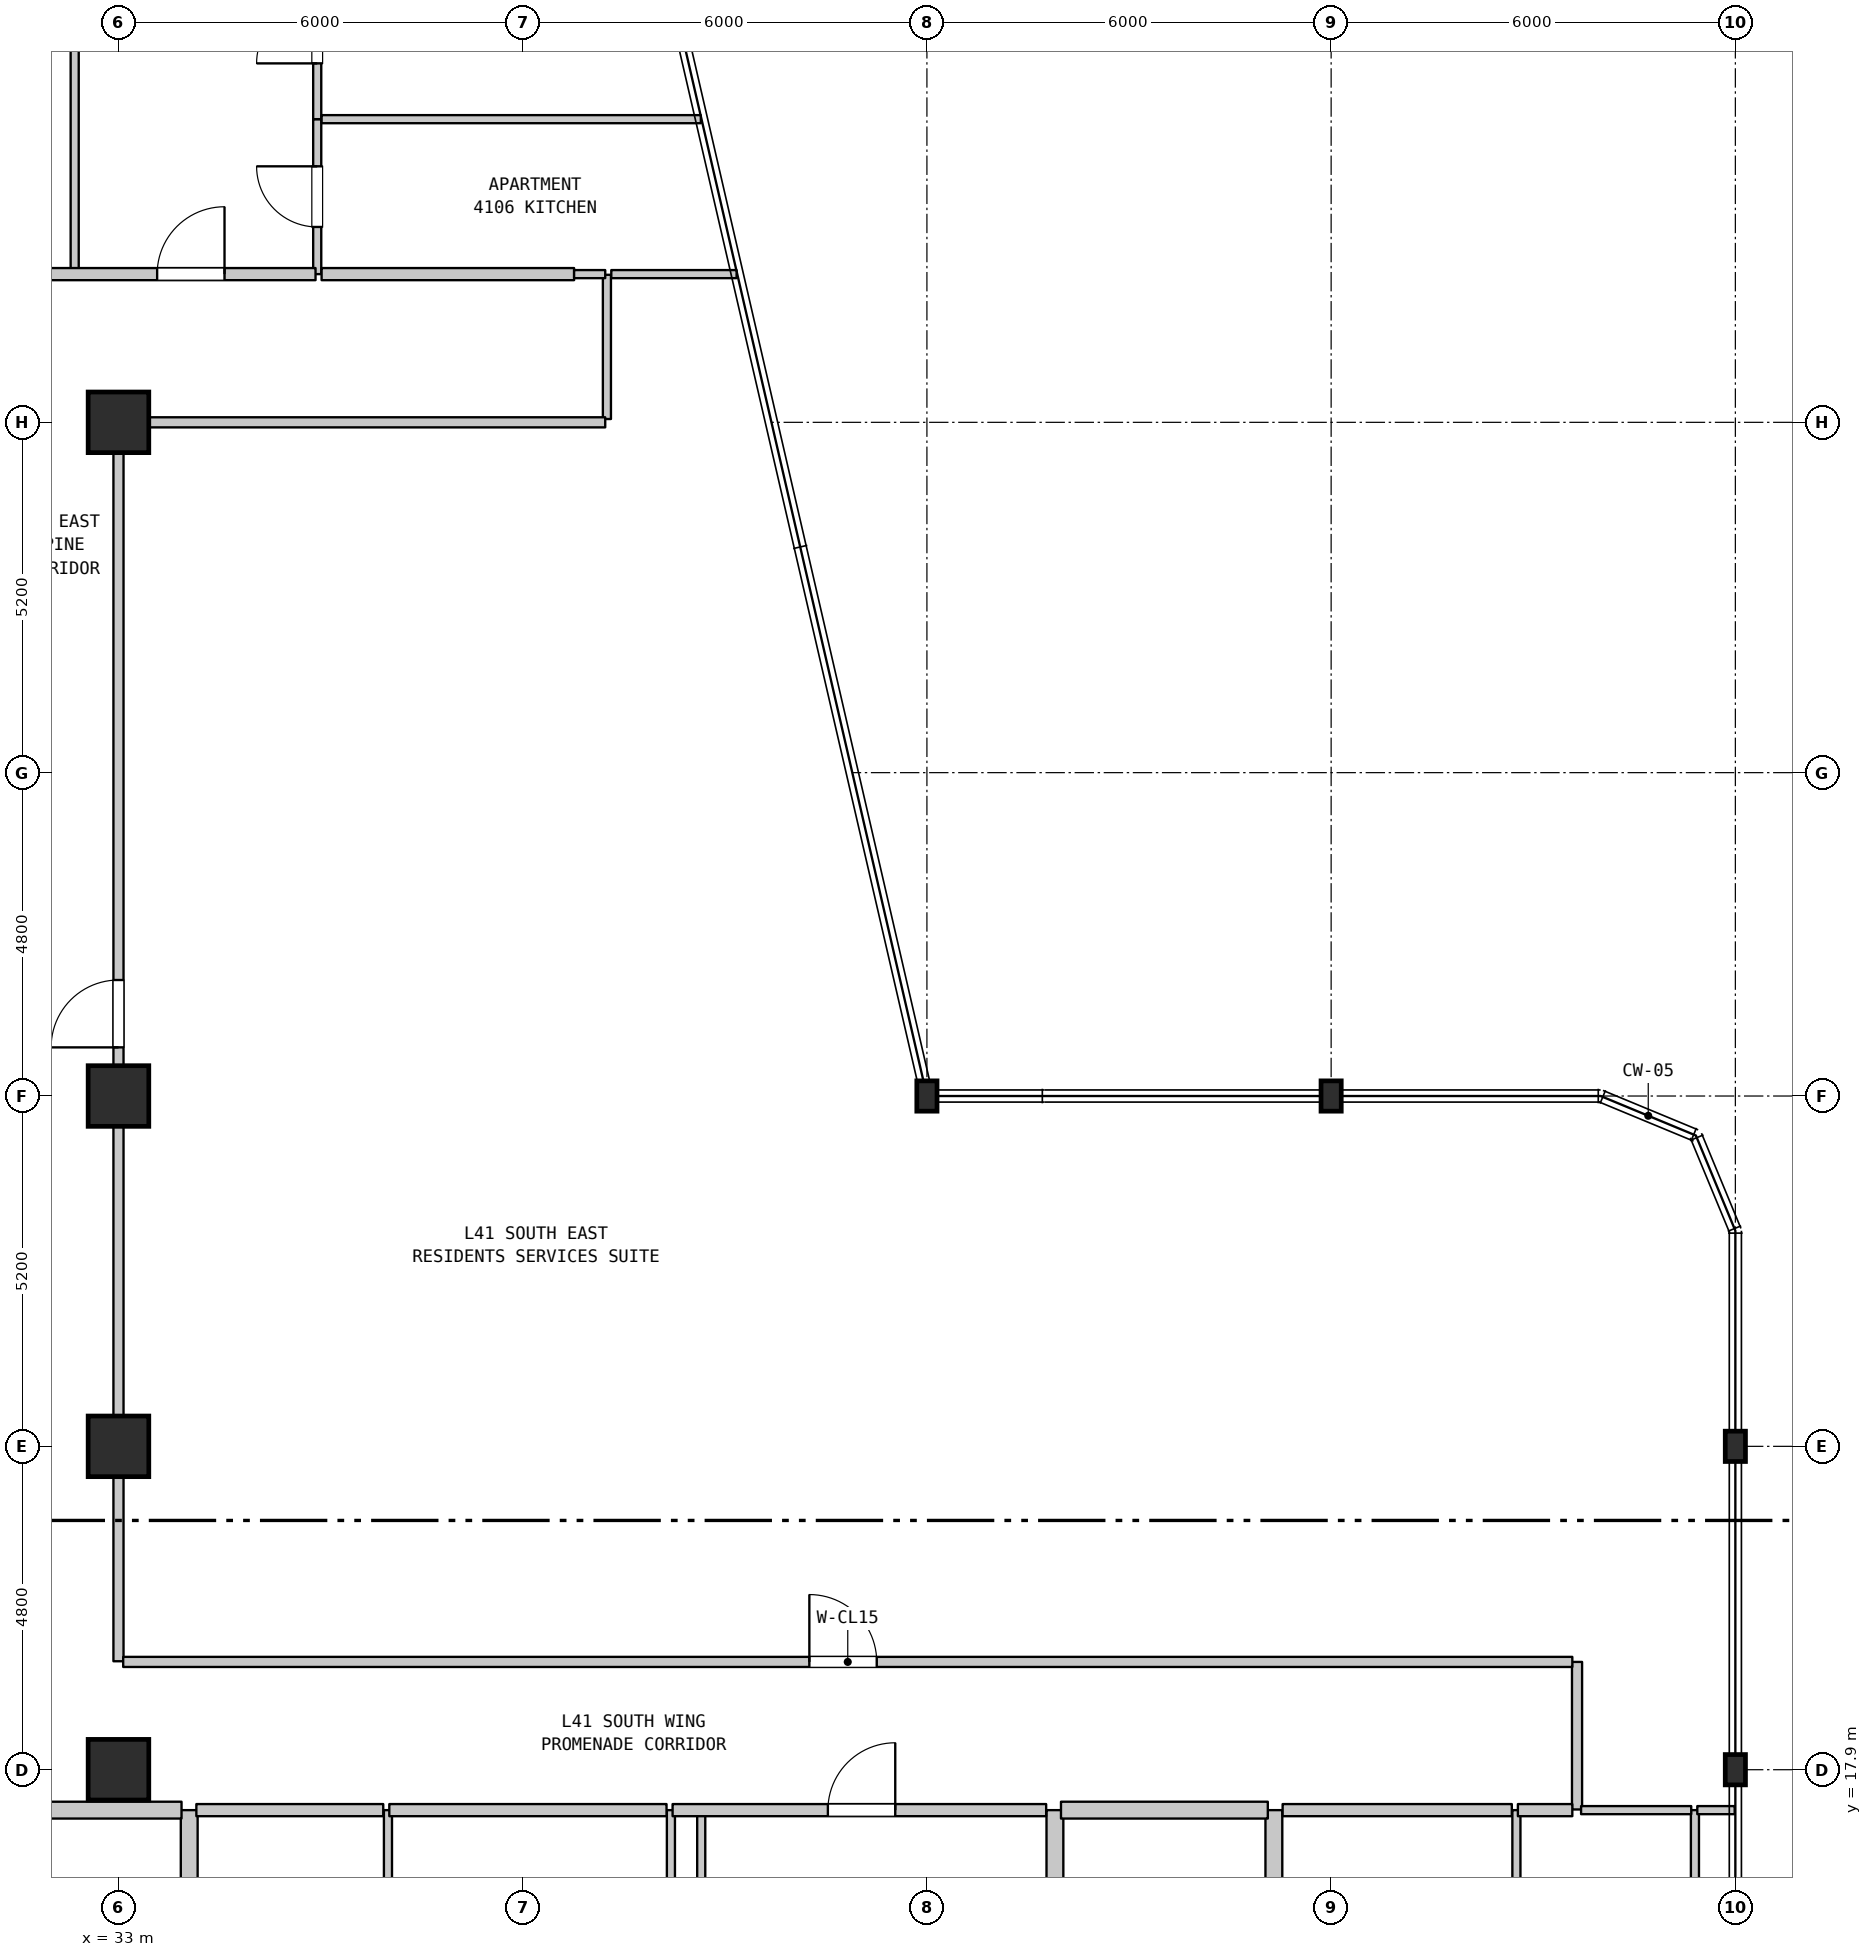
"""IFC4 building model, lengths in metres.
Left out: names, types, materials, properties, quantities, classifications, styles, units other than length and angle.
Written with IfcOpenShell. Run it as: python <this file> out.ifc"""

import sys

from ifc_helpers import new_model, si_unit, direction, frame, frame_2d, origin, origin_2d, place, context, subcontext, project, spatial, rectangle, i_section, extrude, element, fill, save


model = new_model("IFC4")
c1 = context("Model", 3, precision=1e-05, world=origin(), true_north=direction((0.0, 1.0)))
c2 = subcontext(c1, "Body", "Model", "MODEL_VIEW")
j1 = project(units=[si_unit("LENGTHUNIT", "METRE"), si_unit("PLANEANGLEUNIT", "RADIAN")], contexts=[c1])
p1 = place(None, origin())
s1 = spatial("IfcSite", under=j1, at=p1, CompositionType="ELEMENT")
p2 = place(p1, origin())
s2 = spatial("IfcBuilding", under=s1, at=p2, CompositionType="ELEMENT")
p3 = place(p2, frame((0.0, 0.0, 169.1)))
s3 = spatial("IfcBuildingStorey", under=s2, at=p3, CompositionType="ELEMENT", Elevation=169.1)
for number, where, z_axis, x_axis in (
    (1, (33.0, 17.9, 0.0), (0.0, 0.0, 1.0), (1.0, 0.0, 0.0)),
    (2, (33.0, 22.7, 0.0), (0.0, 0.0, 1.0), (1.0, 0.0, 0.0)),
    (3, (33.0, 27.9, 0.0), (0.0, 0.0, 1.0), (1.0, 0.0, 0.0)),
    (4, (33.0, 37.9, 0.0), (0.0, 0.0, 1.0), (1.0, 0.0, 0.0)),
):
    element("IfcColumn", number, at=place(p3, frame(where, z_axis=z_axis, x_axis=x_axis)), inside=s3, PredefinedType="COLUMN", context=c2, shape_type="SweptSolid", body=[
        extrude(rectangle(XDim=0.9, YDim=0.9, at=origin_2d()), origin(), (0.0, 0.0, 1.0), 3.7),
    ])
for number, where, z_axis, x_axis in (
    (5, (45.0, 27.9, 0.0), (0.0, 0.0, 1.0), (1.0, 0.0, 0.0)),
    (6, (51.0, 27.9, 0.0), (0.0, 0.0, 1.0), (1.0, 0.0, 0.0)),
    (7, (57.0, 17.9, 0.0), (0.0, 0.0, 1.0), (1.0, 0.0, 0.0)),
    (8, (57.0, 22.7, 0.0), (0.0, 0.0, 1.0), (1.0, 0.0, 0.0)),
):
    element("IfcColumn", number, at=place(p3, frame(where, z_axis=z_axis, x_axis=x_axis)), inside=s3, PredefinedType="COLUMN", context=c2, shape_type="SweptSolid", body=[
        extrude(i_section(OverallWidth=0.3, OverallDepth=0.45, WebThickness=0.014, FlangeThickness=0.026, FilletRadius=0.027, at=origin_2d()), origin(), (0.0, 0.0, 1.0), 3.7),
    ])
p4 = place(p3, frame((32.35, 40.1, 0.0), z_axis=(0.0, 0.0, 1.0), x_axis=(0.0, 1.0, 0.0)))
e9 = element("IfcWall", 9, at=p4, inside=s3, PredefinedType="PARTITIONING", context=c2, shape_type="SweptSolid", body=[
    extrude(rectangle(XDim=13.79, YDim=0.12, at=frame_2d((6.895, 0.0))), origin(), (0.0, 0.0, 1.0), 3.39),
])
p5 = place(p3, frame((33.0, 19.51, 0.0), z_axis=(0.0, 0.0, 1.0), x_axis=(0.0, 1.0, 0.0)))
e10 = element("IfcWall", 10, at=p5, inside=s3, PredefinedType="STANDARD", context=c2, shape_type="SweptSolid", body=[
    extrude(rectangle(XDim=8.39, YDim=0.15, at=frame_2d((4.195, 0.0))), origin(), (0.0, 0.0, 1.0), 2.99),
])
p6 = place(p3, frame((34.05, 11.15, 0.0), z_axis=(0.0, 0.0, 1.0), x_axis=(0.0, 1.0, 0.0)))
e11 = element("IfcWall", 11, at=p6, inside=s3, PredefinedType="STANDARD", context=c2, shape_type="SweptSolid", body=[
    extrude(rectangle(XDim=6.15, YDim=0.25, at=frame_2d((3.075, 0.0))), origin(), (0.0, 0.0, 1.0), 3.39),
])
p7 = place(p3, frame((35.95, 40.1, 0.0), z_axis=(0.0, 0.0, 1.0), x_axis=(0.0, 1.0, 0.0)))
e12 = element("IfcWall", 12, at=p7, inside=s3, PredefinedType="PARTITIONING", context=c2, shape_type="SweptSolid", body=[
    extrude(rectangle(XDim=2.3, YDim=0.12, at=frame_2d((1.15, 0.0))), origin(), (0.0, 0.0, 1.0), 3.39),
])
p8 = place(p7, frame((0.7, 0.0, 0.0)))
e13 = element("IfcOpeningElement", 13, at=p8, cuts=e12, PredefinedType="OPENING", context=c2, shape_type="SweptSolid", body=[
    extrude(rectangle(XDim=0.9, YDim=2.15, at=frame_2d((0.45, 1.075))), frame((0.0, 0.07, 0.0), z_axis=(0.0, -1.0, 0.0), x_axis=(1.0, 0.0, 0.0)), (0.0, 0.0, 1.0), 0.14),
])
p9 = place(p3, frame((35.95, 42.4, 0.0), z_axis=(0.0, 0.0, 1.0), x_axis=(0.0, 1.0, 0.0)))
e14 = element("IfcWall", 14, at=p9, inside=s3, PredefinedType="PARTITIONING", context=c2, shape_type="SweptSolid", body=[
    extrude(rectangle(XDim=2.7, YDim=0.12, at=frame_2d((1.35, 0.0))), origin(), (0.0, 0.0, 1.0), 3.39),
])
p10 = place(p9, frame((0.828, 0.0, 0.0)))
e15 = element("IfcOpeningElement", 15, at=p10, cuts=e14, PredefinedType="OPENING", context=c2, shape_type="SweptSolid", body=[
    extrude(rectangle(XDim=0.9, YDim=2.1, at=frame_2d((0.45, 1.05))), frame((0.0, 0.07, 0.0), z_axis=(0.0, -1.0, 0.0), x_axis=(1.0, 0.0, 0.0)), (0.0, 0.0, 1.0), 0.14),
])
p11 = place(p3, frame((37.0, 11.15, 0.0), z_axis=(0.0, 0.0, 1.0), x_axis=(0.0, 1.0, 0.0)))
e16 = element("IfcWall", 16, at=p11, inside=s3, PredefinedType="PARTITIONING", context=c2, shape_type="SweptSolid", body=[
    extrude(rectangle(XDim=6.15, YDim=0.12, at=frame_2d((3.075, 0.0))), origin(), (0.0, 0.0, 1.0), 3.39),
])
p12 = place(p3, frame((40.25, 37.949, 0.0), z_axis=(0.0, 0.0, 1.0), x_axis=(0.0, 1.0, 0.0)))
e17 = element("IfcWall", 17, at=p12, inside=s3, PredefinedType="PARTITIONING", context=c2, shape_type="SweptSolid", body=[
    extrude(rectangle(XDim=2.141, YDim=0.12, at=frame_2d((1.071, 0.0))), origin(), (0.0, 0.0, 1.0), 3.39),
])
p13 = place(p3, frame((41.2, 11.15, 0.0), z_axis=(0.0, 0.0, 1.0), x_axis=(0.0, 1.0, 0.0)))
e18 = element("IfcWall", 18, at=p13, inside=s3, PredefinedType="PARTITIONING", context=c2, shape_type="SweptSolid", body=[
    extrude(rectangle(XDim=6.15, YDim=0.12, at=frame_2d((3.075, 0.0))), origin(), (0.0, 0.0, 1.0), 3.39),
])
p14 = place(p3, frame((41.65, 14.85, 0.0), z_axis=(0.0, 0.0, 1.0), x_axis=(0.0, 1.0, 0.0)))
e19 = element("IfcWall", 19, at=p14, inside=s3, PredefinedType="PARTITIONING", context=c2, shape_type="SweptSolid", body=[
    extrude(rectangle(XDim=2.45, YDim=0.12, at=frame_2d((1.225, 0.0))), origin(), (0.0, 0.0, 1.0), 3.39),
])
for number, where, z_axis, x_axis in (
    (20, (46.9, 11.15, 0.0), (0.0, 0.0, 1.0), (0.0, 1.0, 0.0)),
    (21, (50.15, 11.15, 0.0), (0.0, 0.0, 1.0), (0.0, 1.0, 0.0)),
):
    element("IfcWall", number, at=place(p3, frame(where, z_axis=z_axis, x_axis=x_axis)), inside=s3, PredefinedType="STANDARD", context=c2, shape_type="SweptSolid", body=[
        extrude(rectangle(XDim=6.15, YDim=0.25, at=frame_2d((3.075, 0.0))), origin(), (0.0, 0.0, 1.0), 3.39),
    ])
p15 = place(p3, frame((53.75, 11.15, 0.0), z_axis=(0.0, 0.0, 1.0), x_axis=(0.0, 1.0, 0.0)))
e22 = element("IfcWall", 22, at=p15, inside=s3, PredefinedType="PARTITIONING", context=c2, shape_type="SweptSolid", body=[
    extrude(rectangle(XDim=6.15, YDim=0.12, at=frame_2d((3.075, 0.0))), origin(), (0.0, 0.0, 1.0), 3.39),
])
p16 = place(p3, frame((54.65, 17.31, 0.0), z_axis=(0.0, 0.0, 1.0), x_axis=(0.0, 1.0, 0.0)))
e23 = element("IfcWall", 23, at=p16, inside=s3, PredefinedType="STANDARD", context=c2, shape_type="SweptSolid", body=[
    extrude(rectangle(XDim=2.19, YDim=0.15, at=frame_2d((1.095, 0.0))), origin(), (0.0, 0.0, 1.0), 3.39),
])
p17 = place(p3, frame((56.4, 11.15, 0.0), z_axis=(0.0, 0.0, 1.0), x_axis=(0.0, 1.0, 0.0)))
e24 = element("IfcWall", 24, at=p17, inside=s3, PredefinedType="PARTITIONING", context=c2, shape_type="SweptSolid", body=[
    extrude(rectangle(XDim=6.15, YDim=0.12, at=frame_2d((3.075, 0.0))), origin(), (0.0, 0.0, 1.0), 3.39),
])
p18 = place(p3, frame((30.83, 17.3, 0.0), z_axis=(0.0, 0.0, 1.0), x_axis=(1.0, 0.0, 0.0)))
e25 = element("IfcWall", 25, at=p18, inside=s3, PredefinedType="STANDARD", context=c2, shape_type="SweptSolid", body=[
    extrude(rectangle(XDim=3.106, YDim=0.25, at=frame_2d((1.553, 0.0))), origin(), (0.0, 0.0, 1.0), 3.39),
])
p19 = place(p3, frame((34.156, 17.3, 0.0), z_axis=(0.0, 0.0, 1.0), x_axis=(1.0, 0.0, 0.0)))
e26 = element("IfcWall", 26, at=p19, inside=s3, PredefinedType="STANDARD", context=c2, shape_type="SweptSolid", body=[
    extrude(rectangle(XDim=2.774, YDim=0.18, at=frame_2d((1.387, 0.0))), origin(), (0.0, 0.0, 1.0), 3.39),
])
p20 = place(p3, frame((37.02, 17.3, 0.0), z_axis=(0.0, 0.0, 1.0), x_axis=(1.0, 0.0, 0.0)))
e27 = element("IfcWall", 27, at=p20, inside=s3, PredefinedType="STANDARD", context=c2, shape_type="SweptSolid", body=[
    extrude(rectangle(XDim=4.115, YDim=0.18, at=frame_2d((2.058, 0.0))), origin(), (0.0, 0.0, 1.0), 3.39),
])
p21 = place(p3, frame((41.225, 17.3, 0.0), z_axis=(0.0, 0.0, 1.0), x_axis=(1.0, 0.0, 0.0)))
e28 = element("IfcWall", 28, at=p21, inside=s3, PredefinedType="STANDARD", context=c2, shape_type="SweptSolid", body=[
    extrude(rectangle(XDim=5.545, YDim=0.18, at=frame_2d((2.772, 0.0))), origin(), (0.0, 0.0, 1.0), 3.39),
])
p22 = place(p21, frame((2.305, 0.0, 0.0)))
e29 = element("IfcOpeningElement", 29, at=p22, cuts=e28, PredefinedType="OPENING", context=c2, shape_type="SweptSolid", body=[
    extrude(rectangle(XDim=1.0, YDim=2.15, at=frame_2d((0.5, 1.075))), frame((0.0, 0.1, 0.0), z_axis=(0.0, -1.0, 0.0), x_axis=(1.0, 0.0, 0.0)), (0.0, 0.0, 1.0), 0.2),
])
p23 = place(p3, frame((46.99, 17.3, 0.0), z_axis=(0.0, 0.0, 1.0), x_axis=(1.0, 0.0, 0.0)))
e30 = element("IfcWall", 30, at=p23, inside=s3, PredefinedType="STANDARD", context=c2, shape_type="SweptSolid", body=[
    extrude(rectangle(XDim=3.07, YDim=0.25, at=frame_2d((1.535, 0.0))), origin(), (0.0, 0.0, 1.0), 3.39),
])
p24 = place(p3, frame((50.28, 17.3, 0.0), z_axis=(0.0, 0.0, 1.0), x_axis=(1.0, 0.0, 0.0)))
e31 = element("IfcWall", 31, at=p24, inside=s3, PredefinedType="STANDARD", context=c2, shape_type="SweptSolid", body=[
    extrude(rectangle(XDim=3.402, YDim=0.18, at=frame_2d((1.701, 0.0))), origin(), (0.0, 0.0, 1.0), 3.39),
])
p25 = place(p3, frame((53.772, 17.3, 0.0), z_axis=(0.0, 0.0, 1.0), x_axis=(1.0, 0.0, 0.0)))
e32 = element("IfcWall", 32, at=p25, inside=s3, PredefinedType="STANDARD", context=c2, shape_type="SweptSolid", body=[
    extrude(rectangle(XDim=0.808, YDim=0.18, at=frame_2d((0.404, 0.0))), origin(), (0.0, 0.0, 1.0), 3.39),
])
p26 = place(p3, frame((54.71, 17.3, 0.0), z_axis=(0.0, 0.0, 1.0), x_axis=(1.0, 0.0, 0.0)))
e33 = element("IfcWall", 33, at=p26, inside=s3, PredefinedType="PARTITIONING", context=c2, shape_type="SweptSolid", body=[
    extrude(rectangle(XDim=1.635, YDim=0.12, at=frame_2d((0.817, 0.0))), origin(), (0.0, 0.0, 1.0), 3.39),
])
p27 = place(p3, frame((56.435, 17.3, 0.0), z_axis=(0.0, 0.0, 1.0), x_axis=(1.0, 0.0, 0.0)))
e34 = element("IfcWall", 34, at=p27, inside=s3, PredefinedType="PARTITIONING", context=c2, shape_type="SweptSolid", body=[
    extrude(rectangle(XDim=0.555, YDim=0.12, at=frame_2d((0.277, 0.0))), origin(), (0.0, 0.0, 1.0), 3.39),
])
p28 = place(p3, frame((33.07, 19.5, 0.0), z_axis=(0.0, 0.0, 1.0), x_axis=(1.0, 0.0, 0.0)))
e35 = element("IfcWall", 35, at=p28, inside=s3, PredefinedType="STANDARD", context=c2, shape_type="SweptSolid", body=[
    extrude(rectangle(XDim=21.51, YDim=0.15, at=frame_2d((10.755, 0.0))), origin(), (0.0, 0.0, 1.0), 3.39),
])
p29 = place(p28, frame((10.185, 0.0, 0.0)))
e36 = element("IfcOpeningElement", 36, at=p29, cuts=e35, PredefinedType="OPENING", context=c2, shape_type="SweptSolid", body=[
    extrude(rectangle(XDim=1.0, YDim=2.15, at=frame_2d((0.5, 1.075))), frame((0.0, 0.085, 0.0), z_axis=(0.0, -1.0, 0.0), x_axis=(1.0, 0.0, 0.0)), (0.0, 0.0, 1.0), 0.17),
])
p30 = place(p3, frame((33.07, 37.9, 0.0), z_axis=(0.0, 0.0, 1.0), x_axis=(1.0, 0.0, 0.0)))
e37 = element("IfcWall", 37, at=p30, inside=s3, PredefinedType="STANDARD", context=c2, shape_type="SweptSolid", body=[
    extrude(rectangle(XDim=7.155, YDim=0.15, at=frame_2d((3.578, 0.0))), origin(), (0.0, 0.0, 1.0), 3.39),
])
p31 = place(p3, frame((31.965, 40.1, 0.0), z_axis=(0.0, 0.0, 1.0), x_axis=(1.0, 0.0, 0.0)))
e38 = element("IfcWall", 38, at=p31, inside=s3, PredefinedType="STANDARD", context=c2, shape_type="SweptSolid", body=[
    extrude(rectangle(XDim=3.96, YDim=0.18, at=frame_2d((1.98, 0.0))), origin(), (0.0, 0.0, 1.0), 3.39),
])
p32 = place(p31, frame((1.609, 0.0, 0.0)))
e39 = element("IfcOpeningElement", 39, at=p32, cuts=e38, PredefinedType="OPENING", context=c2, shape_type="SweptSolid", body=[
    extrude(rectangle(XDim=1.0, YDim=2.15, at=frame_2d((0.5, 1.075))), frame((0.0, 0.1, 0.0), z_axis=(0.0, -1.0, 0.0), x_axis=(1.0, 0.0, 0.0)), (0.0, 0.0, 1.0), 0.2),
])
p33 = place(p3, frame((36.015, 40.1, 0.0), z_axis=(0.0, 0.0, 1.0), x_axis=(1.0, 0.0, 0.0)))
e40 = element("IfcWall", 40, at=p33, inside=s3, PredefinedType="STANDARD", context=c2, shape_type="SweptSolid", body=[
    extrude(rectangle(XDim=3.748, YDim=0.18, at=frame_2d((1.874, 0.0))), origin(), (0.0, 0.0, 1.0), 3.39),
])
p34 = place(p3, frame((39.763, 40.1, 0.0), z_axis=(0.0, 0.0, 1.0), x_axis=(1.0, 0.0, 0.0)))
e41 = element("IfcWall", 41, at=p34, inside=s3, PredefinedType="PARTITIONING", context=c2, shape_type="SweptSolid", body=[
    extrude(rectangle(XDim=0.462, YDim=0.12, at=frame_2d((0.231, 0.0))), origin(), (0.0, 0.0, 1.0), 3.39),
])
p35 = place(p3, frame((40.315, 40.1, 0.0), z_axis=(0.0, 0.0, 1.0), x_axis=(1.0, 0.0, 0.0)))
e42 = element("IfcWall", 42, at=p35, inside=s3, PredefinedType="PARTITIONING", context=c2, shape_type="SweptSolid", body=[
    extrude(rectangle(XDim=1.86, YDim=0.12, at=frame_2d((0.93, 0.0))), origin(), (0.0, 0.0, 1.0), 3.39),
])
p36 = place(p3, frame((36.015, 42.4, 0.0), z_axis=(0.0, 0.0, 1.0), x_axis=(1.0, 0.0, 0.0)))
e43 = element("IfcWall", 43, at=p36, inside=s3, PredefinedType="PARTITIONING", context=c2, shape_type="SweptSolid", body=[
    extrude(rectangle(XDim=5.629, YDim=0.12, at=frame_2d((2.814, 0.0))), origin(), (0.0, 0.0, 1.0), 3.39),
])
p37 = place(p3, frame((33.0, 27.9, 0.0), z_axis=(0.0, 0.0, 1.0), x_axis=(0.0, 1.0, 0.0)))
e44 = element("IfcWall", 44, at=p37, inside=s3, PredefinedType="STANDARD", context=c2, shape_type="SweptSolid", body=[
    extrude(rectangle(XDim=9.99, YDim=0.15, at=frame_2d((4.995, 0.0))), origin(), (0.0, 0.0, 1.0), 2.89),
])
p38 = place(p37, frame((0.722, 0.0, 0.0)))
e45 = element("IfcOpeningElement", 45, at=p38, cuts=e44, PredefinedType="OPENING", context=c2, shape_type="SweptSolid", body=[
    extrude(rectangle(XDim=1.0, YDim=2.15, at=frame_2d((0.5, 1.075))), frame((0.0, 0.085, 0.0), z_axis=(0.0, -1.0, 0.0), x_axis=(1.0, 0.0, 0.0)), (0.0, 0.0, 1.0), 0.17),
])
p39 = place(p38, origin())
e46 = element("IfcDoor", 46, at=p39, inside=s3, OperationType="SINGLE_SWING_LEFT", PredefinedType="DOOR", context=c2, shape_type="SweptSolid", body=[
    extrude(rectangle(XDim=1.0, YDim=2.15, at=frame_2d((0.5, 1.075))), frame((0.0, 0.025, 0.0), z_axis=(0.0, -1.0, 0.0), x_axis=(1.0, 0.0, 0.0)), (0.0, 0.0, 1.0), 0.05),
])
fill(e45, e46)
p40 = place(p8, origin())
e47 = element("IfcDoor", 47, at=p40, inside=s3, OperationType="SINGLE_SWING_RIGHT", PredefinedType="DOOR", context=c2, shape_type="SweptSolid", body=[
    extrude(rectangle(XDim=0.9, YDim=2.15, at=frame_2d((0.45, 1.075))), frame((0.0, 0.025, 0.0), z_axis=(0.0, -1.0, 0.0), x_axis=(1.0, 0.0, 0.0)), (0.0, 0.0, 1.0), 0.05),
])
fill(e13, e47)
p41 = place(p10, origin())
e48 = element("IfcDoor", 48, at=p41, inside=s3, OperationType="SINGLE_SWING_LEFT", PredefinedType="DOOR", context=c2, shape_type="SweptSolid", body=[
    extrude(rectangle(XDim=0.9, YDim=2.1, at=frame_2d((0.45, 1.05))), frame((0.0, 0.025, 0.0), z_axis=(0.0, -1.0, 0.0), x_axis=(1.0, 0.0, 0.0)), (0.0, 0.0, 1.0), 0.05),
])
fill(e15, e48)
p42 = place(p22, origin())
e49 = element("IfcDoor", 49, at=p42, inside=s3, OperationType="SINGLE_SWING_RIGHT", PredefinedType="DOOR", context=c2, shape_type="SweptSolid", body=[
    extrude(rectangle(XDim=1.0, YDim=2.15, at=frame_2d((0.5, 1.075))), frame((0.0, 0.025, 0.0), z_axis=(0.0, -1.0, 0.0), x_axis=(1.0, 0.0, 0.0)), (0.0, 0.0, 1.0), 0.05),
])
fill(e29, e49)
p43 = place(p29, origin())
e50 = element("IfcDoor", 50, at=p43, inside=s3, OperationType="SINGLE_SWING_LEFT", PredefinedType="DOOR", context=c2, shape_type="SweptSolid", body=[
    extrude(rectangle(XDim=1.0, YDim=2.15, at=frame_2d((0.5, 1.075))), frame((0.0, 0.025, 0.0), z_axis=(0.0, -1.0, 0.0), x_axis=(1.0, 0.0, 0.0)), (0.0, 0.0, 1.0), 0.05),
])
fill(e36, e50)
p44 = place(p32, origin())
e51 = element("IfcDoor", 51, at=p44, inside=s3, OperationType="SINGLE_SWING_RIGHT", PredefinedType="DOOR", context=c2, shape_type="SweptSolid", body=[
    extrude(rectangle(XDim=1.0, YDim=2.15, at=frame_2d((0.5, 1.075))), frame((0.0, 0.025, 0.0), z_axis=(0.0, -1.0, 0.0), x_axis=(1.0, 0.0, 0.0)), (0.0, 0.0, 1.0), 0.05),
])
fill(e39, e51)
save(model, sys.argv[1])
